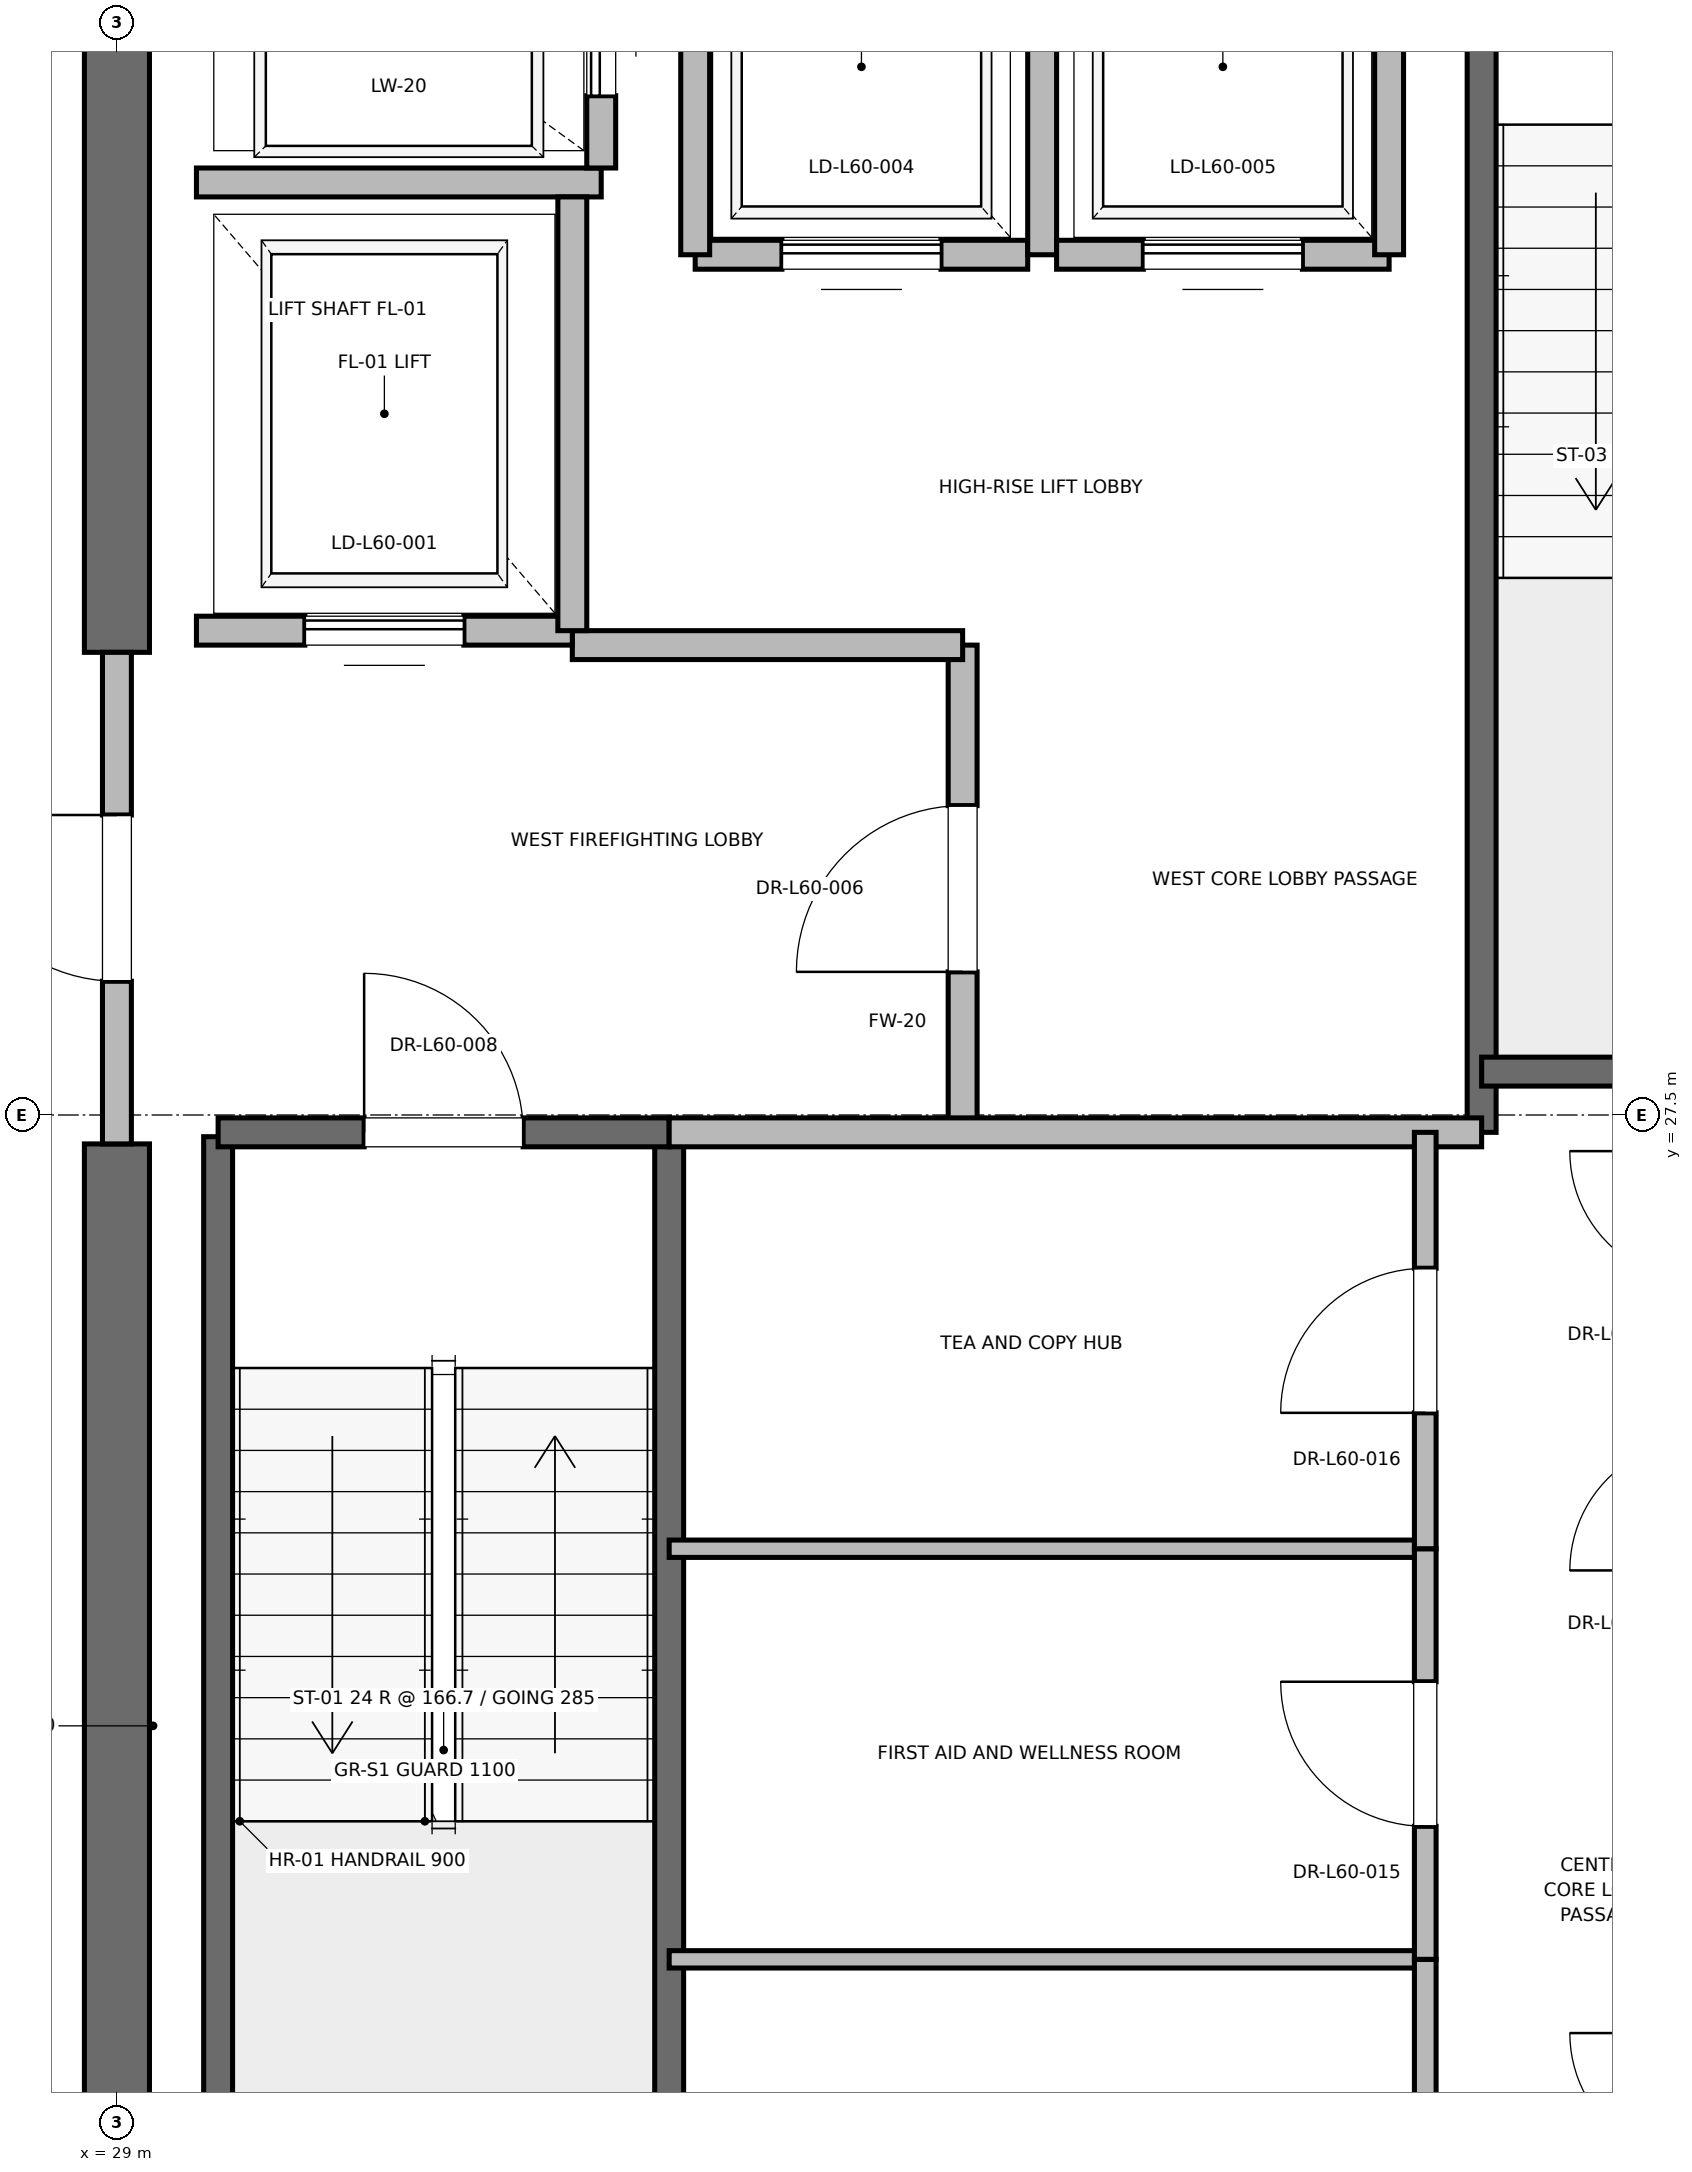
"""IFC4 building model, lengths in metres.
Left out: names, types, materials, properties, quantities, classifications, styles, units other than length and angle.
Written with IfcOpenShell. Run it as: python <this file> out.ifc"""

import sys

from ifc_helpers import new_model, si_unit, direction, frame, frame_2d, origin, place, context, subcontext, project, spatial, rectangle, extrude, element, fill, save


model = new_model("IFC4")
c1 = context("Model", 3, precision=1e-05, world=origin(), true_north=direction((0.0, 1.0)))
c2 = subcontext(c1, "Body", "Model", "MODEL_VIEW")
j1 = project(units=[si_unit("LENGTHUNIT", "METRE"), si_unit("PLANEANGLEUNIT", "RADIAN")], contexts=[c1])
p1 = place(None, origin())
s1 = spatial("IfcSite", under=j1, at=p1, CompositionType="ELEMENT")
p2 = place(p1, origin())
s2 = spatial("IfcBuilding", under=s1, at=p2, CompositionType="ELEMENT")
p3 = place(p2, frame((0.0, 0.0, 259.2)))
s3 = spatial("IfcBuildingStorey", under=s2, at=p3, CompositionType="ELEMENT", Elevation=259.2)
p4 = place(p3, frame((29.0, 18.5, 0.0), z_axis=(0.0, 0.0, 1.0), x_axis=(0.0, 1.0, 0.0)))
e1 = element("IfcWall", 1, at=p4, inside=s3, PredefinedType="SHEAR", context=c2, shape_type="SweptSolid", body=[
    extrude(rectangle(XDim=8.8, YDim=0.45, at=frame_2d((4.4, 0.0))), origin(), (0.0, 0.0, 1.0), 3.785),
])
p5 = place(p3, frame((29.0, 30.7, 0.0), z_axis=(0.0, 0.0, 1.0), x_axis=(0.0, 1.0, 0.0)))
e2 = element("IfcWall", 2, at=p5, inside=s3, PredefinedType="SHEAR", context=c2, shape_type="SweptSolid", body=[
    extrude(rectangle(XDim=5.8, YDim=0.45, at=frame_2d((2.9, 0.0))), origin(), (0.0, 0.0, 1.0), 3.785),
])
p6 = place(p3, frame((29.7, 19.2, 0.0), z_axis=(0.0, 0.0, 1.0), x_axis=(0.0, 1.0, 0.0)))
e3 = element("IfcWall", 3, at=p6, inside=s3, PredefinedType="SOLIDWALL", context=c2, shape_type="SweptSolid", body=[
    extrude(rectangle(XDim=8.15, YDim=0.2, at=frame_2d((4.075, 0.0))), origin(), (0.0, 0.0, 1.0), 3.785),
])
p7 = place(p3, frame((32.82, 18.6, 0.0), z_axis=(0.0, 0.0, 1.0), x_axis=(0.0, 1.0, 0.0)))
e4 = element("IfcWall", 4, at=p7, inside=s3, PredefinedType="SOLIDWALL", context=c2, shape_type="SweptSolid", body=[
    extrude(rectangle(XDim=8.78, YDim=0.2, at=frame_2d((4.39, 0.0))), origin(), (0.0, 0.0, 1.0), 3.785),
])
p8 = place(p3, frame((29.7, 27.38, 0.0), z_axis=(0.0, 0.0, 1.0), x_axis=(1.0, 0.0, 0.0)))
e5 = element("IfcWall", 5, at=p8, inside=s3, PredefinedType="SOLIDWALL", context=c2, shape_type="SweptSolid", body=[
    extrude(rectangle(XDim=3.12, YDim=0.2, at=frame_2d((1.56, 0.0))), origin(), (0.0, 0.0, 1.0), 3.785),
])
p9 = place(p8, frame((1.01, 0.0, 0.0)))
e6 = element("IfcOpeningElement", 6, at=p9, cuts=e5, PredefinedType="OPENING", context=c2, shape_type="SweptSolid", body=[
    extrude(rectangle(XDim=1.1, YDim=2.15, at=frame_2d((0.55, 1.075))), frame((0.0, 0.1, 0.0), z_axis=(0.0, -1.0, 0.0), x_axis=(1.0, 0.0, 0.0)), (0.0, 0.0, 1.0), 0.2),
])
p10 = place(p3, frame((38.44, 27.38, 0.0), z_axis=(0.0, 0.0, 1.0), x_axis=(0.0, 1.0, 0.0)))
e7 = element("IfcWall", 7, at=p10, inside=s3, PredefinedType="SOLIDWALL", context=c2, shape_type="SweptSolid", body=[
    extrude(rectangle(XDim=8.87, YDim=0.2, at=frame_2d((4.435, 0.0))), origin(), (0.0, 0.0, 1.0), 3.785),
])
p11 = place(p3, frame((38.44, 27.8, 0.0), z_axis=(0.0, 0.0, 1.0), x_axis=(1.0, 0.0, 0.0)))
e8 = element("IfcWall", 8, at=p11, inside=s3, PredefinedType="SOLIDWALL", context=c2, shape_type="SweptSolid", body=[
    extrude(rectangle(XDim=3.32, YDim=0.2, at=frame_2d((1.66, 0.0))), origin(), (0.0, 0.0, 1.0), 3.785),
])
p12 = place(p3, frame((34.85, 27.38, 0.0), z_axis=(0.0, 0.0, 1.0), x_axis=(0.0, 1.0, 0.0)))
e9 = element("IfcWall", 9, at=p12, inside=s3, PredefinedType="PARTITIONING", context=c2, shape_type="SweptSolid", body=[
    extrude(rectangle(XDim=3.37, YDim=0.2, at=frame_2d((1.685, 0.0))), origin(), (0.0, 0.0, 1.0), 3.785),
])
p13 = place(p12, frame((1.11, 0.0, 0.0)))
e10 = element("IfcOpeningElement", 10, at=p13, cuts=e9, PredefinedType="OPENING", context=c2, shape_type="SweptSolid", body=[
    extrude(rectangle(XDim=1.15, YDim=2.2, at=frame_2d((0.575, 1.1))), frame((0.0, 0.1, 0.0), z_axis=(0.0, -1.0, 0.0), x_axis=(1.0, 0.0, 0.0)), (0.0, 0.0, 1.0), 0.2),
])
p14 = place(p3, frame((29.0, 27.3, 0.0), z_axis=(0.0, 0.0, 1.0), x_axis=(0.0, 1.0, 0.0)))
e11 = element("IfcWall", 11, at=p14, inside=s3, PredefinedType="PARTITIONING", context=c2, shape_type="SweptSolid", body=[
    extrude(rectangle(XDim=3.4, YDim=0.2, at=frame_2d((1.7, 0.0))), origin(), (0.0, 0.0, 1.0), 2.865),
])
p15 = place(p14, frame((1.125, 0.0, 0.0)))
e12 = element("IfcOpeningElement", 12, at=p15, cuts=e11, PredefinedType="OPENING", context=c2, shape_type="SweptSolid", body=[
    extrude(rectangle(XDim=1.15, YDim=2.2, at=frame_2d((0.575, 1.1))), frame((0.0, 0.1, 0.0), z_axis=(0.0, -1.0, 0.0), x_axis=(1.0, 0.0, 0.0)), (0.0, 0.0, 1.0), 0.2),
])
p16 = place(p3, frame((32.82, 27.38, 0.0), z_axis=(0.0, 0.0, 1.0), x_axis=(1.0, 0.0, 0.0)))
e13 = element("IfcWall", 13, at=p16, inside=s3, PredefinedType="PARTITIONING", context=c2, shape_type="SweptSolid", body=[
    extrude(rectangle(XDim=5.62, YDim=0.2, at=frame_2d((2.81, 0.0))), origin(), (0.0, 0.0, 1.0), 3.785),
])
p17 = place(p3, frame((32.15, 30.75, 0.0), z_axis=(0.0, 0.0, 1.0), x_axis=(1.0, 0.0, 0.0)))
e14 = element("IfcWall", 14, at=p17, inside=s3, PredefinedType="PARTITIONING", context=c2, shape_type="SweptSolid", body=[
    extrude(rectangle(XDim=2.7, YDim=0.2, at=frame_2d((1.35, 0.0))), origin(), (0.0, 0.0, 1.0), 3.785),
])
p18 = place(p3, frame((29.55, 30.85, 0.0), z_axis=(0.0, 0.0, 1.0), x_axis=(1.0, 0.0, 0.0)))
e15 = element("IfcWall", 15, at=p18, inside=s3, PredefinedType="SOLIDWALL", context=c2, shape_type="SweptSolid", body=[
    extrude(rectangle(XDim=2.6, YDim=0.2, at=frame_2d((1.3, 0.0))), origin(), (0.0, 0.0, 1.0), 2.865),
])
p19 = place(p18, frame((0.75, 0.0, 0.0)))
e16 = element("IfcOpeningElement", 16, at=p19, cuts=e15, PredefinedType="OPENING", context=c2, shape_type="SweptSolid", body=[
    extrude(rectangle(XDim=1.1, YDim=2.2, at=frame_2d((0.55, 1.1))), frame((0.0, 0.1, 0.0), z_axis=(0.0, -1.0, 0.0), x_axis=(1.0, 0.0, 0.0)), (0.0, 0.0, 1.0), 0.2),
])
p20 = place(p3, frame((29.55, 33.95, 0.0), z_axis=(0.0, 0.0, 1.0), x_axis=(1.0, 0.0, 0.0)))
e17 = element("IfcWall", 17, at=p20, inside=s3, PredefinedType="SOLIDWALL", context=c2, shape_type="SweptSolid", body=[
    extrude(rectangle(XDim=2.8, YDim=0.2, at=frame_2d((1.4, 0.0))), origin(), (0.0, 0.0, 1.0), 3.785),
])
p21 = place(p3, frame((32.15, 30.85, 0.0), z_axis=(0.0, 0.0, 1.0), x_axis=(0.0, 1.0, 0.0)))
e18 = element("IfcWall", 18, at=p21, inside=s3, PredefinedType="SOLIDWALL", context=c2, shape_type="SweptSolid", body=[
    extrude(rectangle(XDim=3.0, YDim=0.2, at=frame_2d((1.5, 0.0))), origin(), (0.0, 0.0, 1.0), 3.785),
])
p22 = place(p3, frame((32.35, 34.05, 0.0), z_axis=(0.0, 0.0, 1.0), x_axis=(0.0, 1.0, 0.0)))
e19 = element("IfcWall", 19, at=p22, inside=s3, PredefinedType="SOLIDWALL", context=c2, shape_type="SweptSolid", body=[
    extrude(rectangle(XDim=2.1, YDim=0.2, at=frame_2d((1.05, 0.0))), origin(), (0.0, 0.0, 1.0), 3.785),
])
p23 = place(p22, frame((0.5, 0.0, 0.0)))
e20 = element("IfcOpeningElement", 20, at=p23, cuts=e19, PredefinedType="OPENING", context=c2, shape_type="SweptSolid", body=[
    extrude(rectangle(XDim=1.1, YDim=2.2, at=frame_2d((0.55, 1.1))), frame((0.0, 0.1, 0.0), z_axis=(0.0, -1.0, 0.0), x_axis=(1.0, 0.0, 0.0)), (0.0, 0.0, 1.0), 0.2),
])
p24 = place(p3, frame((33.0, 33.45, 0.0), z_axis=(0.0, 0.0, 1.0), x_axis=(1.0, 0.0, 0.0)))
e21 = element("IfcWall", 21, at=p24, inside=s3, PredefinedType="SOLIDWALL", context=c2, shape_type="SweptSolid", body=[
    extrude(rectangle(XDim=2.3, YDim=0.2, at=frame_2d((1.15, 0.0))), origin(), (0.0, 0.0, 1.0), 3.785),
])
p25 = place(p24, frame((0.6, 0.0, 0.0)))
e22 = element("IfcOpeningElement", 22, at=p25, cuts=e21, PredefinedType="OPENING", context=c2, shape_type="SweptSolid", body=[
    extrude(rectangle(XDim=1.1, YDim=2.2, at=frame_2d((0.55, 1.1))), frame((0.0, 0.1, 0.0), z_axis=(0.0, -1.0, 0.0), x_axis=(1.0, 0.0, 0.0)), (0.0, 0.0, 1.0), 0.2),
])
p26 = place(p3, frame((33.0, 36.05, 0.0), z_axis=(0.0, 0.0, 1.0), x_axis=(0.0, -1.0, 0.0)))
e23 = element("IfcWall", 23, at=p26, inside=s3, PredefinedType="SOLIDWALL", context=c2, shape_type="SweptSolid", body=[
    extrude(rectangle(XDim=2.6, YDim=0.2, at=frame_2d((1.3, 0.0))), origin(), (0.0, 0.0, 1.0), 3.785),
])
p27 = place(p3, frame((35.4, 33.45, 0.0), z_axis=(0.0, 0.0, 1.0), x_axis=(0.0, 1.0, 0.0)))
e24 = element("IfcWall", 24, at=p27, inside=s3, PredefinedType="SOLIDWALL", context=c2, shape_type="SweptSolid", body=[
    extrude(rectangle(XDim=2.6, YDim=0.2, at=frame_2d((1.3, 0.0))), origin(), (0.0, 0.0, 1.0), 2.865),
])
p28 = place(p3, frame((35.5, 33.45, 0.0), z_axis=(0.0, 0.0, 1.0), x_axis=(1.0, 0.0, 0.0)))
e25 = element("IfcWall", 25, at=p28, inside=s3, PredefinedType="SOLIDWALL", context=c2, shape_type="SweptSolid", body=[
    extrude(rectangle(XDim=2.3, YDim=0.2, at=frame_2d((1.15, 0.0))), origin(), (0.0, 0.0, 1.0), 3.785),
])
p29 = place(p28, frame((0.6, 0.0, 0.0)))
e26 = element("IfcOpeningElement", 26, at=p29, cuts=e25, PredefinedType="OPENING", context=c2, shape_type="SweptSolid", body=[
    extrude(rectangle(XDim=1.1, YDim=2.2, at=frame_2d((0.55, 1.1))), frame((0.0, 0.1, 0.0), z_axis=(0.0, -1.0, 0.0), x_axis=(1.0, 0.0, 0.0)), (0.0, 0.0, 1.0), 0.2),
])
p30 = place(p3, frame((37.8, 33.45, 0.0), z_axis=(0.0, 0.0, 1.0), x_axis=(0.0, 1.0, 0.0)))
e27 = element("IfcWall", 27, at=p30, inside=s3, PredefinedType="SOLIDWALL", context=c2, shape_type="SweptSolid", body=[
    extrude(rectangle(XDim=2.6, YDim=0.2, at=frame_2d((1.3, 0.0))), origin(), (0.0, 0.0, 1.0), 2.865),
])
for number, where, z_axis, x_axis in (
    (28, (32.82, 21.66, 0.0), (0.0, 0.0, 1.0), (1.0, 0.0, 0.0)),
    (29, (32.82, 24.5, 0.0), (0.0, 0.0, 1.0), (1.0, 0.0, 0.0)),
):
    element("IfcWall", number, at=place(p3, frame(where, z_axis=z_axis, x_axis=x_axis)), inside=s3, PredefinedType="PARTITIONING", context=c2, shape_type="SweptSolid", body=[
        extrude(rectangle(XDim=5.23, YDim=0.12, at=frame_2d((2.615, 0.0))), origin(), (0.0, 0.0, 1.0), 2.85),
    ])
p31 = place(p3, frame((38.05, 18.6, 0.0), z_axis=(0.0, 0.0, 1.0), x_axis=(0.0, 1.0, 0.0)))
e30 = element("IfcWall", 30, at=p31, inside=s3, PredefinedType="PARTITIONING", context=c2, shape_type="SweptSolid", body=[
    extrude(rectangle(XDim=3.06, YDim=0.15, at=frame_2d((1.53, 0.0))), origin(), (0.0, 0.0, 1.0), 2.85),
])
p32 = place(p31, frame((1.03, 0.0, 0.0)))
e31 = element("IfcOpeningElement", 31, at=p32, cuts=e30, PredefinedType="OPENING", context=c2, shape_type="SweptSolid", body=[
    extrude(rectangle(XDim=1.0, YDim=2.15, at=frame_2d((0.5, 1.075))), frame((0.0, 0.075, 0.0), z_axis=(0.0, -1.0, 0.0), x_axis=(1.0, 0.0, 0.0)), (0.0, 0.0, 1.0), 0.15),
])
p33 = place(p3, frame((38.05, 21.66, 0.0), z_axis=(0.0, 0.0, 1.0), x_axis=(0.0, 1.0, 0.0)))
e32 = element("IfcWall", 32, at=p33, inside=s3, PredefinedType="PARTITIONING", context=c2, shape_type="SweptSolid", body=[
    extrude(rectangle(XDim=2.84, YDim=0.15, at=frame_2d((1.42, 0.0))), origin(), (0.0, 0.0, 1.0), 2.85),
])
p34 = place(p33, frame((0.92, 0.0, 0.0)))
e33 = element("IfcOpeningElement", 33, at=p34, cuts=e32, PredefinedType="OPENING", context=c2, shape_type="SweptSolid", body=[
    extrude(rectangle(XDim=1.0, YDim=2.15, at=frame_2d((0.5, 1.075))), frame((0.0, 0.075, 0.0), z_axis=(0.0, -1.0, 0.0), x_axis=(1.0, 0.0, 0.0)), (0.0, 0.0, 1.0), 0.15),
])
p35 = place(p3, frame((38.05, 24.5, 0.0), z_axis=(0.0, 0.0, 1.0), x_axis=(0.0, 1.0, 0.0)))
e34 = element("IfcWall", 34, at=p35, inside=s3, PredefinedType="PARTITIONING", context=c2, shape_type="SweptSolid", body=[
    extrude(rectangle(XDim=2.88, YDim=0.15, at=frame_2d((1.44, 0.0))), origin(), (0.0, 0.0, 1.0), 2.85),
])
p36 = place(p35, frame((0.94, 0.0, 0.0)))
e35 = element("IfcOpeningElement", 35, at=p36, cuts=e34, PredefinedType="OPENING", context=c2, shape_type="SweptSolid", body=[
    extrude(rectangle(XDim=1.0, YDim=2.15, at=frame_2d((0.5, 1.075))), frame((0.0, 0.075, 0.0), z_axis=(0.0, -1.0, 0.0), x_axis=(1.0, 0.0, 0.0)), (0.0, 0.0, 1.0), 0.15),
])
p37 = place(p9, origin())
e36 = element("IfcDoor", 36, at=p37, inside=s3, OperationType="SINGLE_SWING_LEFT", PredefinedType="DOOR", context=c2, shape_type="SweptSolid", body=[
    extrude(rectangle(XDim=1.1, YDim=2.15, at=frame_2d((0.55, 1.075))), frame((0.0, 0.025, 0.0), z_axis=(0.0, -1.0, 0.0), x_axis=(1.0, 0.0, 0.0)), (0.0, 0.0, 1.0), 0.05),
])
fill(e6, e36)
p38 = place(p13, origin())
e37 = element("IfcDoor", 37, at=p38, inside=s3, OperationType="SINGLE_SWING_LEFT", PredefinedType="DOOR", context=c2, shape_type="SweptSolid", body=[
    extrude(rectangle(XDim=1.15, YDim=2.2, at=frame_2d((0.575, 1.1))), frame((0.0, 0.025, 0.0), z_axis=(0.0, -1.0, 0.0), x_axis=(1.0, 0.0, 0.0)), (0.0, 0.0, 1.0), 0.05),
])
fill(e10, e37)
p39 = place(p15, origin())
e38 = element("IfcDoor", 38, at=p39, inside=s3, OperationType="SINGLE_SWING_RIGHT", PredefinedType="DOOR", context=c2, shape_type="SweptSolid", body=[
    extrude(rectangle(XDim=1.15, YDim=2.2, at=frame_2d((0.575, 1.1))), frame((0.0, 0.025, 0.0), z_axis=(0.0, -1.0, 0.0), x_axis=(1.0, 0.0, 0.0)), (0.0, 0.0, 1.0), 0.05),
])
fill(e12, e38)
p40 = place(p19, origin())
e39 = element("IfcDoor", 39, at=p40, inside=s3, OperationType="SLIDING_TO_RIGHT", PredefinedType="DOOR", context=c2, shape_type="SweptSolid", body=[
    extrude(rectangle(XDim=1.1, YDim=2.2, at=frame_2d((0.55, 1.1))), frame((0.0, 0.025, 0.0), z_axis=(0.0, -1.0, 0.0), x_axis=(1.0, 0.0, 0.0)), (0.0, 0.0, 1.0), 0.05),
])
fill(e16, e39)
p41 = place(p23, origin())
e40 = element("IfcDoor", 40, at=p41, inside=s3, OperationType="SLIDING_TO_RIGHT", PredefinedType="DOOR", context=c2, shape_type="SweptSolid", body=[
    extrude(rectangle(XDim=1.1, YDim=2.2, at=frame_2d((0.55, 1.1))), frame((0.0, 0.025, 0.0), z_axis=(0.0, -1.0, 0.0), x_axis=(1.0, 0.0, 0.0)), (0.0, 0.0, 1.0), 0.05),
])
fill(e20, e40)
p42 = place(p25, origin())
e41 = element("IfcDoor", 41, at=p42, inside=s3, OperationType="SLIDING_TO_RIGHT", PredefinedType="DOOR", context=c2, shape_type="SweptSolid", body=[
    extrude(rectangle(XDim=1.1, YDim=2.2, at=frame_2d((0.55, 1.1))), frame((0.0, 0.025, 0.0), z_axis=(0.0, -1.0, 0.0), x_axis=(1.0, 0.0, 0.0)), (0.0, 0.0, 1.0), 0.05),
])
fill(e22, e41)
p43 = place(p29, origin())
e42 = element("IfcDoor", 42, at=p43, inside=s3, OperationType="SLIDING_TO_RIGHT", PredefinedType="DOOR", context=c2, shape_type="SweptSolid", body=[
    extrude(rectangle(XDim=1.1, YDim=2.2, at=frame_2d((0.55, 1.1))), frame((0.0, 0.025, 0.0), z_axis=(0.0, -1.0, 0.0), x_axis=(1.0, 0.0, 0.0)), (0.0, 0.0, 1.0), 0.05),
])
fill(e26, e42)
p44 = place(p34, origin())
e43 = element("IfcDoor", 43, at=p44, inside=s3, OperationType="SINGLE_SWING_RIGHT", PredefinedType="DOOR", context=c2, shape_type="SweptSolid", body=[
    extrude(rectangle(XDim=1.0, YDim=2.15, at=frame_2d((0.5, 1.075))), frame((0.0, 0.025, 0.0), z_axis=(0.0, -1.0, 0.0), x_axis=(1.0, 0.0, 0.0)), (0.0, 0.0, 1.0), 0.05),
])
fill(e33, e43)
p45 = place(p36, origin())
e44 = element("IfcDoor", 44, at=p45, inside=s3, OperationType="SINGLE_SWING_LEFT", PredefinedType="DOOR", context=c2, shape_type="SweptSolid", body=[
    extrude(rectangle(XDim=1.0, YDim=2.15, at=frame_2d((0.5, 1.075))), frame((0.0, 0.025, 0.0), z_axis=(0.0, -1.0, 0.0), x_axis=(1.0, 0.0, 0.0)), (0.0, 0.0, 1.0), 0.05),
])
fill(e35, e44)
save(model, sys.argv[1])
